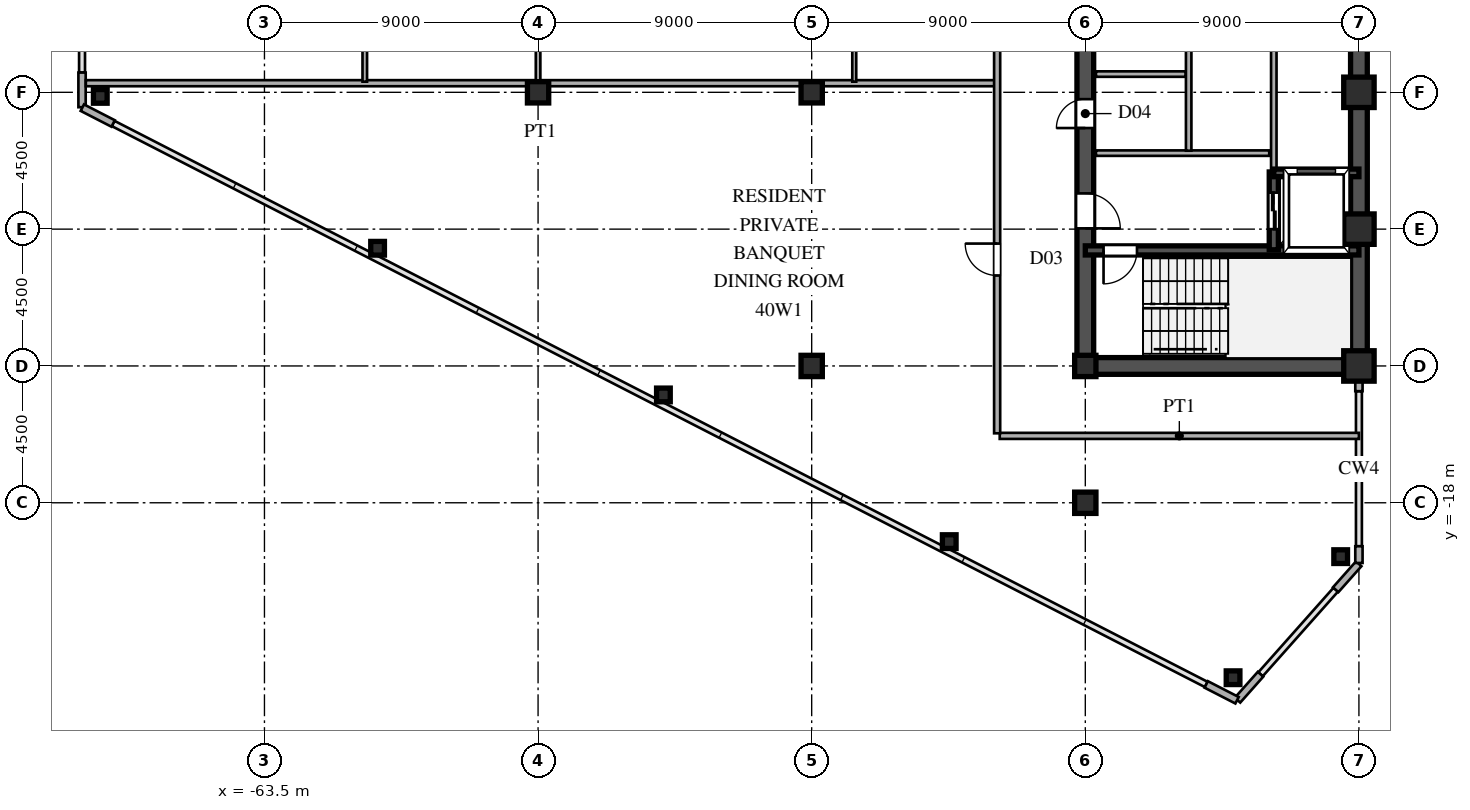
"""IFC4 building model, lengths in metres.
Left out: names, types, materials, properties, quantities, classifications, styles, units other than length and angle.
Written with IfcOpenShell. Run it as: python <this file> out.ifc"""

import sys

from ifc_helpers import new_model, si_unit, direction, frame, frame_2d, origin, origin_2d, place, context, subcontext, project, spatial, rectangle, hollow_rectangle, i_section, extrude, source, transform, mapped, element, fill, save


model = new_model("IFC4")
c1 = context("Model", 3, precision=1e-05, world=origin(), true_north=direction((0.0, 1.0)))
c2 = subcontext(c1, "Body", "Model", "MODEL_VIEW")
j1 = project(units=[si_unit("LENGTHUNIT", "METRE"), si_unit("PLANEANGLEUNIT", "RADIAN")], contexts=[c1])
p1 = place(None, origin())
s1 = spatial("IfcSite", under=j1, at=p1, CompositionType="ELEMENT")
p2 = place(p1, origin())
s2 = spatial("IfcBuilding", under=s1, at=p2, CompositionType="ELEMENT")
p3 = place(p2, frame((0.0, 0.0, 151.2)))
s3 = spatial("IfcBuildingStorey", under=s2, at=p3, CompositionType="ELEMENT", Elevation=151.2)
m1 = source(origin(), c2, "Body", "SweptSolid", [
    extrude(hollow_rectangle(XDim=1.0, YDim=1.0, WallThickness=0.042, at=origin_2d()), origin(), (0.0, 0.0, 1.0), 3.6),
])
for number, where, z_axis, x_axis in (
    (1, (-27.5, -13.5, 0.0), (0.0, 0.0, 1.0), (1.0, 0.0, 0.0)),
    (2, (-27.5, -9.0, 0.0), (0.0, 0.0, 1.0), (1.0, 0.0, 0.0)),
    (3, (-27.5, -4.5, 0.0), (0.0, 0.0, 1.0), (1.0, 0.0, 0.0)),
):
    element("IfcColumn", number, at=place(p3, frame(where, z_axis=z_axis, x_axis=x_axis)), inside=s3, PredefinedType="COLUMN", context=c2, shape_type="MappedRepresentation", body=[
        mapped(m1, transform((0.0, 0.0, 0.0), scale=1.0)),
    ])
m2 = source(origin(), c2, "Body", "SweptSolid", [
    extrude(i_section(OverallWidth=0.7, OverallDepth=0.7, WebThickness=0.028, FlangeThickness=0.045, at=origin_2d()), origin(), (0.0, 0.0, 1.0), 3.6),
])
for number, where, z_axis, x_axis in (
    (4, (-36.5, -18.0, 0.0), (0.0, 0.0, 1.0), (1.0, 0.0, 0.0)),
    (5, (-36.5, -13.5, 0.0), (0.0, 0.0, 1.0), (1.0, 0.0, 0.0)),
    (6, (-45.5, -13.5, 0.0), (0.0, 0.0, 1.0), (1.0, 0.0, 0.0)),
    (7, (-45.5, -4.5, 0.0), (0.0, 0.0, 1.0), (1.0, 0.0, 0.0)),
    (8, (-54.5, -4.5, 0.0), (0.0, 0.0, 1.0), (1.0, 0.0, 0.0)),
):
    element("IfcColumn", number, at=place(p3, frame(where, z_axis=z_axis, x_axis=x_axis)), inside=s3, PredefinedType="COLUMN", context=c2, shape_type="MappedRepresentation", body=[
        mapped(m2, transform((0.0, 0.0, 0.0), scale=1.0)),
    ])
m3 = source(origin(), c2, "Body", "SweptSolid", [
    extrude(hollow_rectangle(XDim=0.45, YDim=0.45, WallThickness=0.018, at=origin_2d()), origin(), (0.0, 0.0, 1.0), 3.6),
])
for number, where, z_axis, x_axis in (
    (9, (-28.1, -19.772, 0.0), (0.0, 0.0, 1.0), (1.0, 0.0, 0.0)),
    (10, (-68.9, -4.634, 0.0), (0.0, 0.0, 1.0), (1.0, 0.0, 0.0)),
    (11, (-31.64, -23.754, 0.0), (0.0, 0.0, 1.0), (1.0, 0.0, 0.0)),
    (12, (-40.976, -19.278, 0.0), (0.0, 0.0, 1.0), (1.0, 0.0, 0.0)),
    (13, (-50.377, -14.453, 0.0), (0.0, 0.0, 1.0), (1.0, 0.0, 0.0)),
    (14, (-59.779, -9.629, 0.0), (0.0, 0.0, 1.0), (1.0, 0.0, 0.0)),
):
    element("IfcColumn", number, at=place(p3, frame(where, z_axis=z_axis, x_axis=x_axis)), inside=s3, PredefinedType="COLUMN", context=c2, shape_type="MappedRepresentation", body=[
        mapped(m3, transform((0.0, 0.0, 0.0), scale=1.0)),
    ])
p4 = place(p3, frame((-27.5, -19.98, 0.0), z_axis=(0.0, 0.0, 1.0), x_axis=(0.0, 1.0, 0.0)))
e15 = element("IfcWall", 15, at=p4, inside=s3, PredefinedType="SOLIDWALL", context=c2, shape_type="SweptSolid", body=[
    extrude(rectangle(XDim=0.55, YDim=0.24, at=frame_2d((0.275, 0.0))), origin(), (0.0, 0.0, 1.0), 3.38),
])
p5 = place(p3, frame((-27.5, -14.33, 0.0), z_axis=(0.0, 0.0, 1.0), x_axis=(0.0, 1.0, 0.0)))
e16 = element("IfcWall", 16, at=p5, inside=s3, PredefinedType="SOLIDWALL", context=c2, shape_type="SweptSolid", body=[
    extrude(rectangle(XDim=0.55, YDim=0.24, at=frame_2d((0.275, 0.0))), origin(), (0.0, 0.0, 1.0), 2.88),
])
p6 = place(p3, frame((-69.5, -3.85, 0.0), z_axis=(0.0, 0.0, 1.0), x_axis=(0.0, -1.0, 0.0)))
e17 = element("IfcWall", 17, at=p6, inside=s3, PredefinedType="SOLIDWALL", context=c2, shape_type="SweptSolid", body=[
    extrude(rectangle(XDim=1.14, YDim=0.24, at=frame_2d((0.57, 0.0))), origin(), (0.0, 0.0, 1.0), 3.38),
])
for number, where, z_axis, x_axis in (
    (18, (-69.491, -5.005, 0.0), (0.0, 0.0, 1.0), (0.89, -0.456, 0.0)),
    (19, (-32.523, -23.975, 0.0), (0.0, 0.0, 1.0), (0.89, -0.456, 0.0)),
):
    element("IfcWall", number, at=place(p3, frame(where, z_axis=z_axis, x_axis=x_axis)), inside=s3, PredefinedType="SOLIDWALL", context=c2, shape_type="SweptSolid", body=[
        extrude(rectangle(XDim=1.14, YDim=0.24, at=frame_2d((0.57, 0.0))), origin(), (0.0, 0.0, 1.0), 3.38),
    ])
for number, where, z_axis, x_axis in (
    (20, (-31.493, -24.492, 0.0), (0.0, 0.0, 1.0), (0.664, 0.747, 0.0)),
    (21, (-28.264, -20.86, 0.0), (0.0, 0.0, 1.0), (0.664, 0.747, 0.0)),
):
    element("IfcWall", number, at=place(p3, frame(where, z_axis=z_axis, x_axis=x_axis)), inside=s3, PredefinedType="SOLIDWALL", context=c2, shape_type="SweptSolid", body=[
        extrude(rectangle(XDim=1.14, YDim=0.24, at=frame_2d((0.57, 0.0))), origin(), (0.0, 0.0, 1.0), 3.38),
    ])
p7 = place(p3, frame((-27.5, -13.5, 0.0), z_axis=(0.0, 0.0, 1.0), x_axis=(0.0, 1.0, 0.0)))
e22 = element("IfcWall", 22, at=p7, inside=s3, PredefinedType="SHEAR", context=c2, shape_type="SweptSolid", body=[
    extrude(rectangle(XDim=12.2, YDim=0.55, at=frame_2d((6.1, 0.0))), origin(), (0.0, 0.0, 1.0), 3.38),
])
p8 = place(p3, frame((-36.5, -13.5, 0.0), z_axis=(0.0, 0.0, 1.0), x_axis=(1.0, 0.0, 0.0)))
e23 = element("IfcWall", 23, at=p8, inside=s3, PredefinedType="SHEAR", context=c2, shape_type="SweptSolid", body=[
    extrude(rectangle(XDim=9.0, YDim=0.55, at=frame_2d((4.5, 0.0))), origin(), (0.0, 0.0, 1.0), 3.38),
])
p9 = place(p3, frame((-36.5, -13.65, 0.0), z_axis=(0.0, 0.0, 1.0), x_axis=(0.0, 1.0, 0.0)))
e24 = element("IfcWall", 24, at=p9, inside=s3, PredefinedType="SHEAR", context=c2, shape_type="SweptSolid", body=[
    extrude(rectangle(XDim=7.15, YDim=0.55, at=frame_2d((3.575, 0.0))), origin(), (0.0, 0.0, 1.0), 3.38),
])
p10 = place(p9, frame((4.675, 0.0, 0.0)))
e25 = element("IfcOpeningElement", 25, at=p10, cuts=e24, PredefinedType="OPENING", context=c2, shape_type="SweptSolid", body=[
    extrude(rectangle(XDim=1.15, YDim=2.2, at=frame_2d((0.575, 1.1))), frame((0.0, 0.285, 0.0), z_axis=(0.0, -1.0, 0.0), x_axis=(1.0, 0.0, 0.0)), (0.0, 0.0, 1.0), 0.57),
])
p11 = place(p3, frame((-36.5, -6.5, 0.0), z_axis=(0.0, 0.0, 1.0), x_axis=(0.0, 1.0, 0.0)))
e26 = element("IfcWall", 26, at=p11, inside=s3, PredefinedType="SHEAR", context=c2, shape_type="SweptSolid", body=[
    extrude(rectangle(XDim=2.6, YDim=0.55, at=frame_2d((1.3, 0.0))), origin(), (0.0, 0.0, 1.0), 3.38),
])
p12 = place(p11, frame((0.825, 0.0, 0.0)))
e27 = element("IfcOpeningElement", 27, at=p12, cuts=e26, PredefinedType="OPENING", context=c2, shape_type="SweptSolid", body=[
    extrude(rectangle(XDim=0.95, YDim=2.15, at=frame_2d((0.475, 1.075))), frame((0.0, 0.285, 0.0), z_axis=(0.0, -1.0, 0.0), x_axis=(1.0, 0.0, 0.0)), (0.0, 0.0, 1.0), 0.57),
])
p13 = place(p3, frame((-36.5, -3.9, 0.0), z_axis=(0.0, 0.0, 1.0), x_axis=(0.0, 1.0, 0.0)))
e28 = element("IfcWall", 28, at=p13, inside=s3, PredefinedType="SHEAR", context=c2, shape_type="SweptSolid", body=[
    extrude(rectangle(XDim=2.6, YDim=0.55, at=frame_2d((1.3, 0.0))), origin(), (0.0, 0.0, 1.0), 3.38),
])
p14 = place(p13, frame((0.825, 0.0, 0.0)))
e29 = element("IfcOpeningElement", 29, at=p14, cuts=e28, PredefinedType="OPENING", context=c2, shape_type="SweptSolid", body=[
    extrude(rectangle(XDim=0.95, YDim=2.15, at=frame_2d((0.475, 1.075))), frame((0.0, 0.285, 0.0), z_axis=(0.0, -1.0, 0.0), x_axis=(1.0, 0.0, 0.0)), (0.0, 0.0, 1.0), 0.57),
])
p15 = place(p3, frame((-36.5, -9.7, 0.0), z_axis=(0.0, 0.0, 1.0), x_axis=(1.0, 0.0, 0.0)))
e30 = element("IfcWall", 30, at=p15, inside=s3, PredefinedType="SHEAR", context=c2, shape_type="SweptSolid", body=[
    extrude(rectangle(XDim=9.0, YDim=0.3, at=frame_2d((4.5, 0.0))), origin(), (0.0, 0.0, 1.0), 3.38),
])
p16 = place(p15, frame((0.6, 0.0, 0.0)))
e31 = element("IfcOpeningElement", 31, at=p16, cuts=e30, PredefinedType="OPENING", context=c2, shape_type="SweptSolid", body=[
    extrude(rectangle(XDim=1.1, YDim=2.2, at=frame_2d((0.55, 1.1))), frame((0.0, 0.16, 0.0), z_axis=(0.0, -1.0, 0.0), x_axis=(1.0, 0.0, 0.0)), (0.0, 0.0, 1.0), 0.32),
])
p17 = place(p3, frame((-30.3, -7.15, 0.0), z_axis=(0.0, 0.0, 1.0), x_axis=(1.0, 0.0, 0.0)))
e32 = element("IfcWall", 32, at=p17, inside=s3, PredefinedType="SHEAR", context=c2, shape_type="SweptSolid", body=[
    extrude(rectangle(XDim=2.8, YDim=0.25, at=frame_2d((1.4, 0.0))), origin(), (0.0, 0.0, 1.0), 3.38),
])
p18 = place(p3, frame((-30.3, -9.68, 0.0), z_axis=(0.0, 0.0, 1.0), x_axis=(0.0, 1.0, 0.0)))
e33 = element("IfcWall", 33, at=p18, inside=s3, PredefinedType="SHEAR", context=c2, shape_type="SweptSolid", body=[
    extrude(rectangle(XDim=2.56, YDim=0.3, at=frame_2d((1.28, 0.0))), origin(), (0.0, 0.0, 1.0), 3.38),
])
p19 = place(p18, frame((0.68, 0.0, 0.0)))
e34 = element("IfcOpeningElement", 34, at=p19, cuts=e33, PredefinedType="OPENING", context=c2, shape_type="SweptSolid", body=[
    extrude(rectangle(XDim=1.2, YDim=2.25, at=frame_2d((0.6, 1.125))), frame((0.0, 0.16, 0.0), z_axis=(0.0, -1.0, 0.0), x_axis=(1.0, 0.0, 0.0)), (0.0, 0.0, 1.0), 0.32),
])
p20 = place(p3, frame((-36.15, -6.5, 0.0), z_axis=(0.0, 0.0, 1.0), x_axis=(1.0, 0.0, 0.0)))
e35 = element("IfcWall", 35, at=p20, inside=s3, PredefinedType="PARTITIONING", context=c2, shape_type="SweptSolid", body=[
    extrude(rectangle(XDim=5.7, YDim=0.18, at=frame_2d((2.85, 0.0))), origin(), (0.0, 0.0, 1.0), 3.38),
])
p21 = place(p3, frame((-33.1, -6.42, 0.0), z_axis=(0.0, 0.0, 1.0), x_axis=(0.0, 1.0, 0.0)))
e36 = element("IfcWall", 36, at=p21, inside=s3, PredefinedType="PARTITIONING", context=c2, shape_type="SweptSolid", body=[
    extrude(rectangle(XDim=5.04, YDim=0.18, at=frame_2d((2.52, 0.0))), origin(), (0.0, 0.0, 1.0), 3.38),
])
p22 = place(p3, frame((-30.3, -7.12, 0.0), z_axis=(0.0, 0.0, 1.0), x_axis=(0.0, 1.0, 0.0)))
e37 = element("IfcWall", 37, at=p22, inside=s3, PredefinedType="PARTITIONING", context=c2, shape_type="SweptSolid", body=[
    extrude(rectangle(XDim=5.74, YDim=0.18, at=frame_2d((2.87, 0.0))), origin(), (0.0, 0.0, 1.0), 3.38),
])
p23 = place(p3, frame((-36.15, -3.9, 0.0), z_axis=(0.0, 0.0, 1.0), x_axis=(1.0, 0.0, 0.0)))
e38 = element("IfcWall", 38, at=p23, inside=s3, PredefinedType="PARTITIONING", context=c2, shape_type="SweptSolid", body=[
    extrude(rectangle(XDim=2.95, YDim=0.18, at=frame_2d((1.475, 0.0))), origin(), (0.0, 0.0, 1.0), 3.38),
])
p24 = place(p3, frame((-39.315, -15.8, 0.0), z_axis=(0.0, 0.0, 1.0), x_axis=(1.0, 0.0, 0.0)))
e39 = element("IfcWall", 39, at=p24, inside=s3, PredefinedType="PARTITIONING", context=c2, shape_type="SweptSolid", body=[
    extrude(rectangle(XDim=11.815, YDim=0.2, at=frame_2d((5.907, 0.0))), origin(), (0.0, 0.0, 1.0), 3.38),
])
p25 = place(p3, frame((-69.375, -4.2, 0.0), z_axis=(0.0, 0.0, 1.0), x_axis=(1.0, 0.0, 0.0)))
e40 = element("IfcWall", 40, at=p25, inside=s3, PredefinedType="PARTITIONING", context=c2, shape_type="SweptSolid", body=[
    extrude(rectangle(XDim=29.895, YDim=0.2, at=frame_2d((14.948, 0.0))), origin(), (0.0, 0.0, 1.0), 3.38),
])
p26 = place(p3, frame((-60.2, -4.15, 0.0), z_axis=(0.0, 0.0, 1.0), x_axis=(0.0, 1.0, 0.0)))
e41 = element("IfcWall", 41, at=p26, inside=s3, PredefinedType="PARTITIONING", context=c2, shape_type="SweptSolid", body=[
    extrude(rectangle(XDim=8.567, YDim=0.15, at=frame_2d((4.283, 0.0))), origin(), (0.0, 0.0, 1.0), 3.38),
])
p27 = place(p26, frame((1.642, 0.0, 0.0)))
e42 = element("IfcOpeningElement", 42, at=p27, cuts=e41, PredefinedType="OPENING", context=c2, shape_type="SweptSolid", body=[
    extrude(rectangle(XDim=0.95, YDim=2.15, at=frame_2d((0.475, 1.075))), frame((0.0, 0.085, 0.0), z_axis=(0.0, -1.0, 0.0), x_axis=(1.0, 0.0, 0.0)), (0.0, 0.0, 1.0), 0.17),
])
p28 = place(p26, frame((5.975, 0.0, 0.0)))
e43 = element("IfcOpeningElement", 43, at=p28, cuts=e41, PredefinedType="OPENING", context=c2, shape_type="SweptSolid", body=[
    extrude(rectangle(XDim=0.95, YDim=2.15, at=frame_2d((0.475, 1.075))), frame((0.0, 0.085, 0.0), z_axis=(0.0, -1.0, 0.0), x_axis=(1.0, 0.0, 0.0)), (0.0, 0.0, 1.0), 0.17),
])
p29 = place(p3, frame((-54.5, -4.15, 0.0), z_axis=(0.0, 0.0, 1.0), x_axis=(0.0, 1.0, 0.0)))
e44 = element("IfcWall", 44, at=p29, inside=s3, PredefinedType="PARTITIONING", context=c2, shape_type="SweptSolid", body=[
    extrude(rectangle(XDim=12.9, YDim=0.15, at=frame_2d((6.45, 0.0))), origin(), (0.0, 0.0, 1.0), 2.78),
])
p30 = place(p29, frame((5.975, 0.0, 0.0)))
e45 = element("IfcOpeningElement", 45, at=p30, cuts=e44, PredefinedType="OPENING", context=c2, shape_type="SweptSolid", body=[
    extrude(rectangle(XDim=0.95, YDim=2.15, at=frame_2d((0.475, 1.075))), frame((0.0, 0.085, 0.0), z_axis=(0.0, -1.0, 0.0), x_axis=(1.0, 0.0, 0.0)), (0.0, 0.0, 1.0), 0.17),
])
p31 = place(p3, frame((-44.1, -4.15, 0.0), z_axis=(0.0, 0.0, 1.0), x_axis=(0.0, 1.0, 0.0)))
e46 = element("IfcWall", 46, at=p31, inside=s3, PredefinedType="PARTITIONING", context=c2, shape_type="SweptSolid", body=[
    extrude(rectangle(XDim=3.408, YDim=0.13, at=frame_2d((1.704, 0.0))), origin(), (0.0, 0.0, 1.0), 3.38),
])
p32 = place(p3, frame((-39.4, -15.715, 0.0), z_axis=(0.0, 0.0, 1.0), x_axis=(0.0, 1.0, 0.0)))
e47 = element("IfcWall", 47, at=p32, inside=s3, PredefinedType="PARTITIONING", context=c2, shape_type="SweptSolid", body=[
    extrude(rectangle(XDim=31.43, YDim=0.2, at=frame_2d((15.715, 0.0))), origin(), (0.0, 0.0, 1.0), 3.38),
])
p33 = place(p32, frame((5.19, 0.0, 0.0)))
e48 = element("IfcOpeningElement", 48, at=p33, cuts=e47, PredefinedType="OPENING", context=c2, shape_type="SweptSolid", body=[
    extrude(rectangle(XDim=1.05, YDim=2.25, at=frame_2d((0.525, 1.125))), frame((0.0, 0.11, 0.0), z_axis=(0.0, -1.0, 0.0), x_axis=(1.0, 0.0, 0.0)), (0.0, 0.0, 1.0), 0.22),
])
p34 = place(p32, frame((17.295, 0.0, 0.0)))
e49 = element("IfcOpeningElement", 49, at=p34, cuts=e47, PredefinedType="OPENING", context=c2, shape_type="SweptSolid", body=[
    extrude(rectangle(XDim=1.05, YDim=2.25, at=frame_2d((0.525, 1.125))), frame((0.0, 0.11, 0.0), z_axis=(0.0, -1.0, 0.0), x_axis=(1.0, 0.0, 0.0)), (0.0, 0.0, 1.0), 0.22),
])
p35 = place(p32, frame((27.49, 0.0, 0.0)))
e50 = element("IfcOpeningElement", 50, at=p35, cuts=e47, PredefinedType="OPENING", context=c2, shape_type="SweptSolid", body=[
    extrude(rectangle(XDim=1.05, YDim=2.25, at=frame_2d((0.525, 1.125))), frame((0.0, 0.11, 0.0), z_axis=(0.0, -1.0, 0.0), x_axis=(1.0, 0.0, 0.0)), (0.0, 0.0, 1.0), 0.22),
])
m4 = source(origin(), c2, "Body", "SweptSolid", [
    extrude(rectangle(XDim=1.15, YDim=2.2, at=frame_2d((0.575, 1.1))), frame((0.0, 0.025, 0.0), z_axis=(0.0, -1.0, 0.0), x_axis=(1.0, 0.0, 0.0)), (0.0, 0.0, 1.0), 0.05),
])
p36 = place(p10, frame((1.15, 0.0, 0.0), z_axis=(0.0, 0.0, 1.0), x_axis=(-1.0, 0.0, 0.0)))
e51 = element("IfcDoor", 51, at=p36, inside=s3, OperationType="SINGLE_SWING_LEFT", PredefinedType="DOOR", context=c2, shape_type="MappedRepresentation", body=[
    mapped(m4, transform((0.0, 0.0, 0.0), scale=1.0)),
])
fill(e25, e51)
m5 = source(origin(), c2, "Body", "SweptSolid", [
    extrude(rectangle(XDim=0.95, YDim=2.15, at=frame_2d((0.475, 1.075))), frame((0.0, 0.025, 0.0), z_axis=(0.0, -1.0, 0.0), x_axis=(1.0, 0.0, 0.0)), (0.0, 0.0, 1.0), 0.05),
])
p37 = place(p12, origin())
e52 = element("IfcDoor", 52, at=p37, inside=s3, OperationType="SINGLE_SWING_LEFT", PredefinedType="DOOR", context=c2, shape_type="MappedRepresentation", body=[
    mapped(m5, transform((0.0, 0.0, 0.0), scale=1.0)),
])
fill(e27, e52)
m6 = source(origin(), c2, "Body", "SweptSolid", [
    extrude(rectangle(XDim=1.1, YDim=2.2, at=frame_2d((0.55, 1.1))), frame((0.0, 0.025, 0.0), z_axis=(0.0, -1.0, 0.0), x_axis=(1.0, 0.0, 0.0)), (0.0, 0.0, 1.0), 0.05),
])
p38 = place(p16, frame((1.1, 0.0, 0.0), z_axis=(0.0, 0.0, 1.0), x_axis=(-1.0, 0.0, 0.0)))
e53 = element("IfcDoor", 53, at=p38, inside=s3, OperationType="SINGLE_SWING_LEFT", PredefinedType="DOOR", context=c2, shape_type="MappedRepresentation", body=[
    mapped(m6, transform((0.0, 0.0, 0.0), scale=1.0)),
])
fill(e31, e53)
m7 = source(origin(), c2, "Body", "SweptSolid", [
    extrude(rectangle(XDim=1.2, YDim=2.25, at=frame_2d((0.6, 1.125))), frame((0.0, 0.025, 0.0), z_axis=(0.0, -1.0, 0.0), x_axis=(1.0, 0.0, 0.0)), (0.0, 0.0, 1.0), 0.05),
])
p39 = place(p19, origin())
e54 = element("IfcDoor", 54, at=p39, inside=s3, OperationType="DOUBLE_DOOR_SLIDING", PredefinedType="DOOR", context=c2, shape_type="MappedRepresentation", body=[
    mapped(m7, transform((0.0, 0.0, 0.0), scale=1.0)),
])
fill(e34, e54)
m8 = source(origin(), c2, "Body", "SweptSolid", [
    extrude(rectangle(XDim=1.05, YDim=2.25, at=frame_2d((0.525, 1.125))), frame((0.0, 0.025, 0.0), z_axis=(0.0, -1.0, 0.0), x_axis=(1.0, 0.0, 0.0)), (0.0, 0.0, 1.0), 0.05),
])
p40 = place(p33, origin())
e55 = element("IfcDoor", 55, at=p40, inside=s3, OperationType="SINGLE_SWING_RIGHT", PredefinedType="DOOR", context=c2, shape_type="MappedRepresentation", body=[
    mapped(m8, transform((0.0, 0.0, 0.0), scale=1.0)),
])
fill(e48, e55)
save(model, sys.argv[1])
